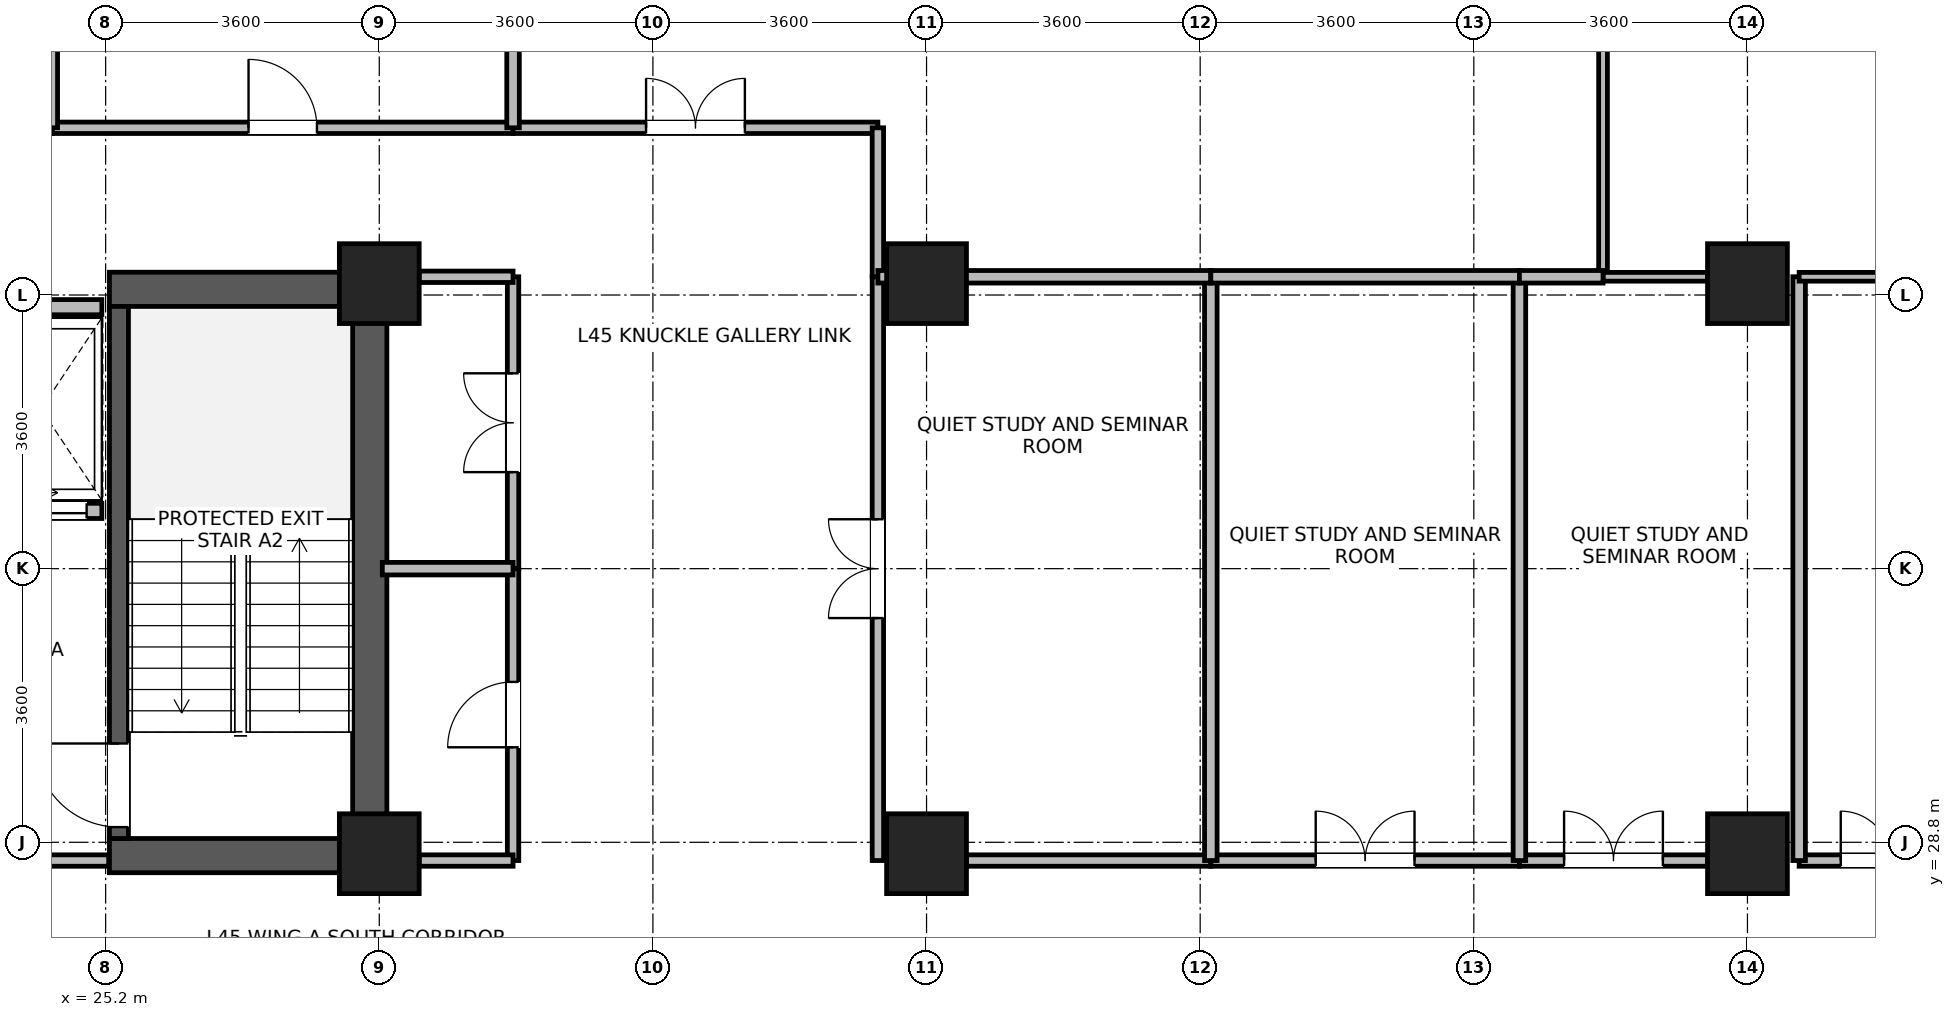
"""IFC4 building model, lengths in metres.
Left out: names, types, materials, properties, quantities, classifications, styles, units other than length and angle.
Written with IfcOpenShell. Run it as: python <this file> out.ifc"""

import sys

from ifc_helpers import new_model, si_unit, direction, frame, frame_2d, origin, origin_2d, place, context, subcontext, project, spatial, rectangle, extrude, source, transform, mapped, element, fill, save


model = new_model("IFC4")
c1 = context("Model", 3, precision=1e-05, world=origin(), true_north=direction((0.0, 1.0)))
c2 = subcontext(c1, "Body", "Model", "MODEL_VIEW")
j1 = project(units=[si_unit("LENGTHUNIT", "METRE"), si_unit("PLANEANGLEUNIT", "RADIAN")], contexts=[c1])
p1 = place(None, origin())
s1 = spatial("IfcSite", under=j1, at=p1, CompositionType="ELEMENT")
p2 = place(p1, origin())
s2 = spatial("IfcBuilding", under=s1, at=p2, CompositionType="ELEMENT")
p3 = place(p2, frame((0.0, 0.0, 177.2)))
s3 = spatial("IfcBuildingStorey", under=s2, at=p3, CompositionType="ELEMENT", Elevation=177.2)
p4 = place(p3, frame((28.675, 28.4, 0.0), z_axis=(0.0, 0.0, 1.0), x_axis=(0.0, 1.0, 0.0)))
e1 = element("IfcWall", 1, at=p4, inside=s3, PredefinedType="SHEAR", context=c2, shape_type="SweptSolid", body=[
    extrude(rectangle(XDim=7.9, YDim=0.45, at=frame_2d((3.95, 0.0))), origin(), (0.0, 0.0, 1.0), 3.46),
])
for number, where, z_axis, x_axis in (
    (2, (25.25, 28.625, 0.0), (0.0, 0.0, 1.0), (1.0, 0.0, 0.0)),
    (3, (25.25, 36.075, 0.0), (0.0, 0.0, 1.0), (1.0, 0.0, 0.0)),
):
    element("IfcWall", number, at=place(p3, frame(where, z_axis=z_axis, x_axis=x_axis)), inside=s3, PredefinedType="SHEAR", context=c2, shape_type="SweptSolid", body=[
        extrude(rectangle(XDim=3.2, YDim=0.45, at=frame_2d((1.6, 0.0))), origin(), (0.0, 0.0, 1.0), 3.46),
    ])
p5 = place(p3, frame((25.375, 28.85, 0.0), z_axis=(0.0, 0.0, 1.0), x_axis=(0.0, 1.0, 0.0)))
e4 = element("IfcWall", 4, at=p5, inside=s3, PredefinedType="SHEAR", context=c2, shape_type="SweptSolid", body=[
    extrude(rectangle(XDim=7.0, YDim=0.25, at=frame_2d((3.5, 0.0))), origin(), (0.0, 0.0, 1.0), 3.46),
])
p6 = place(p5, frame((0.15, 0.0, 0.0)))
e5 = element("IfcOpeningElement", 5, at=p6, cuts=e4, PredefinedType="OPENING", context=c2, shape_type="SweptSolid", body=[
    extrude(rectangle(XDim=1.1, YDim=2.08, at=frame_2d((0.55, 1.04))), frame((0.0, 0.135, 0.0), z_axis=(0.0, -1.0, 0.0), x_axis=(1.0, 0.0, 0.0)), (0.0, 0.0, 1.0), 0.27),
])
m1 = source(origin(), c2, "Body", "SweptSolid", [
    extrude(rectangle(XDim=1.05, YDim=1.05, at=origin_2d()), origin(), (0.0, 0.0, 1.0), 3.7),
])
for number, where, z_axis, x_axis in (
    (6, (28.8, 28.65, 0.0), (0.0, 0.0, 1.0), (1.0, 0.0, 0.0)),
    (7, (28.8, 36.15, 0.0), (0.0, 0.0, 1.0), (1.0, 0.0, 0.0)),
    (8, (36.0, 28.65, 0.0), (0.0, 0.0, 1.0), (1.0, 0.0, 0.0)),
    (9, (36.0, 36.15, 0.0), (0.0, 0.0, 1.0), (1.0, 0.0, 0.0)),
    (10, (46.8, 28.65, 0.0), (0.0, 0.0, 1.0), (1.0, 0.0, 0.0)),
    (11, (46.8, 36.15, 0.0), (0.0, 0.0, 1.0), (1.0, 0.0, 0.0)),
):
    element("IfcColumn", number, at=place(p3, frame(where, z_axis=z_axis, x_axis=x_axis)), inside=s3, PredefinedType="COLUMN", context=c2, shape_type="MappedRepresentation", body=[
        mapped(m1, transform((0.0, 0.0, 0.0), x_axis=(1.0, 0.0, 0.0), y_axis=(0.0, 1.0, 0.0), z_axis=(0.0, 0.0, 1.0), scale=1.0)),
    ])
p7 = place(p3, frame((23.55, 33.16, 0.0), z_axis=(0.0, 0.0, 1.0), x_axis=(1.0, 0.0, 0.0)))
e12 = element("IfcWall", 12, at=p7, inside=s3, PredefinedType="PARTITIONING", context=c2, shape_type="SweptSolid", body=[
    extrude(rectangle(XDim=1.6, YDim=0.2, at=frame_2d((0.8, 0.0))), origin(), (0.0, 0.0, 1.0), 3.44),
])
p8 = place(p7, frame((0.2, 0.0, 0.0)))
e13 = element("IfcOpeningElement", 13, at=p8, cuts=e12, PredefinedType="OPENING", context=c2, shape_type="SweptSolid", body=[
    extrude(rectangle(XDim=1.2, YDim=2.12, at=frame_2d((0.6, 1.06))), frame((0.0, 0.11, 0.0), z_axis=(0.0, -1.0, 0.0), x_axis=(1.0, 0.0, 0.0)), (0.0, 0.0, 1.0), 0.22),
])
p9 = place(p3, frame((23.55, 35.84, 0.0), z_axis=(0.0, 0.0, 1.0), x_axis=(1.0, 0.0, 0.0)))
e14 = element("IfcWall", 14, at=p9, inside=s3, PredefinedType="PARTITIONING", context=c2, shape_type="SweptSolid", body=[
    extrude(rectangle(XDim=1.6, YDim=0.2, at=frame_2d((0.8, 0.0))), origin(), (0.0, 0.0, 1.0), 2.44),
])
p10 = place(p3, frame((35.36, 28.56, 0.0), z_axis=(0.0, 0.0, 1.0), x_axis=(0.0, 1.0, 0.0)))
e15 = element("IfcWall", 15, at=p10, inside=s3, PredefinedType="PARTITIONING", context=c2, shape_type="SweptSolid", body=[
    extrude(rectangle(XDim=7.68, YDim=0.15, at=frame_2d((3.84, 0.0))), origin(), (0.0, 0.0, 1.0), 3.44),
])
p11 = place(p10, frame((3.19, 0.0, 0.0)))
e16 = element("IfcOpeningElement", 16, at=p11, cuts=e15, PredefinedType="OPENING", context=c2, shape_type="SweptSolid", body=[
    extrude(rectangle(XDim=1.3, YDim=2.12, at=frame_2d((0.65, 1.06))), frame((0.0, 0.085, 0.0), z_axis=(0.0, -1.0, 0.0), x_axis=(1.0, 0.0, 0.0)), (0.0, 0.0, 1.0), 0.17),
])
p12 = place(p3, frame((47.48, 28.56, 0.0), z_axis=(0.0, 0.0, 1.0), x_axis=(1.0, 0.0, 0.0)))
e17 = element("IfcWall", 17, at=p12, inside=s3, PredefinedType="PARTITIONING", context=c2, shape_type="SweptSolid", body=[
    extrude(rectangle(XDim=2.395, YDim=0.15, at=frame_2d((1.198, 0.0))), origin(), (0.0, 0.0, 1.0), 2.84),
])
p13 = place(p12, frame((0.548, 0.0, 0.0)))
e18 = element("IfcOpeningElement", 18, at=p13, cuts=e17, PredefinedType="OPENING", context=c2, shape_type="SweptSolid", body=[
    extrude(rectangle(XDim=1.3, YDim=2.12, at=frame_2d((0.65, 1.06))), frame((0.0, 0.085, 0.0), z_axis=(0.0, -1.0, 0.0), x_axis=(1.0, 0.0, 0.0)), (0.0, 0.0, 1.0), 0.17),
])
p14 = place(p3, frame((24.5, 38.2, 0.0), z_axis=(0.0, 0.0, 1.0), x_axis=(1.0, 0.0, 0.0)))
e19 = element("IfcWall", 19, at=p14, inside=s3, PredefinedType="PARTITIONING", context=c2, shape_type="SweptSolid", body=[
    extrude(rectangle(XDim=6.06, YDim=0.15, at=frame_2d((3.03, 0.0))), origin(), (0.0, 0.0, 1.0), 3.44),
])
p15 = place(p14, frame((2.58, 0.0, 0.0)))
e20 = element("IfcOpeningElement", 20, at=p15, cuts=e19, PredefinedType="OPENING", context=c2, shape_type="SweptSolid", body=[
    extrude(rectangle(XDim=0.9, YDim=2.08, at=frame_2d((0.45, 1.04))), frame((0.0, 0.085, 0.0), z_axis=(0.0, -1.0, 0.0), x_axis=(1.0, 0.0, 0.0)), (0.0, 0.0, 1.0), 0.17),
])
p16 = place(p3, frame((30.56, 38.2, 0.0), z_axis=(0.0, 0.0, 1.0), x_axis=(1.0, 0.0, 0.0)))
e21 = element("IfcWall", 21, at=p16, inside=s3, PredefinedType="PARTITIONING", context=c2, shape_type="SweptSolid", body=[
    extrude(rectangle(XDim=4.8, YDim=0.15, at=frame_2d((2.4, 0.0))), origin(), (0.0, 0.0, 1.0), 3.44),
])
p17 = place(p16, frame((1.75, 0.0, 0.0)))
e22 = element("IfcOpeningElement", 22, at=p17, cuts=e21, PredefinedType="OPENING", context=c2, shape_type="SweptSolid", body=[
    extrude(rectangle(XDim=1.3, YDim=2.12, at=frame_2d((0.65, 1.06))), frame((0.0, 0.085, 0.0), z_axis=(0.0, -1.0, 0.0), x_axis=(1.0, 0.0, 0.0)), (0.0, 0.0, 1.0), 0.17),
])
p18 = place(p3, frame((36.525, 28.56, 0.0), z_axis=(0.0, 0.0, 1.0), x_axis=(1.0, 0.0, 0.0)))
e23 = element("IfcWall", 23, at=p18, inside=s3, PredefinedType="PARTITIONING", context=c2, shape_type="SweptSolid", body=[
    extrude(rectangle(XDim=3.215, YDim=0.15, at=frame_2d((1.607, 0.0))), origin(), (0.0, 0.0, 1.0), 2.84),
])
p19 = place(p3, frame((39.74, 28.56, 0.0), z_axis=(0.0, 0.0, 1.0), x_axis=(1.0, 0.0, 0.0)))
e24 = element("IfcWall", 24, at=p19, inside=s3, PredefinedType="PARTITIONING", context=c2, shape_type="SweptSolid", body=[
    extrude(rectangle(XDim=4.06, YDim=0.15, at=frame_2d((2.03, 0.0))), origin(), (0.0, 0.0, 1.0), 2.84),
])
p20 = place(p19, frame((1.38, 0.0, 0.0)))
e25 = element("IfcOpeningElement", 25, at=p20, cuts=e24, PredefinedType="OPENING", context=c2, shape_type="SweptSolid", body=[
    extrude(rectangle(XDim=1.3, YDim=2.12, at=frame_2d((0.65, 1.06))), frame((0.0, 0.085, 0.0), z_axis=(0.0, -1.0, 0.0), x_axis=(1.0, 0.0, 0.0)), (0.0, 0.0, 1.0), 0.17),
])
p21 = place(p3, frame((30.56, 32.4, 0.0), z_axis=(0.0, 0.0, 1.0), x_axis=(0.0, 1.0, 0.0)))
e26 = element("IfcWall", 26, at=p21, inside=s3, PredefinedType="PARTITIONING", context=c2, shape_type="SweptSolid", body=[
    extrude(rectangle(XDim=3.84, YDim=0.15, at=frame_2d((1.92, 0.0))), origin(), (0.0, 0.0, 1.0), 3.44),
])
p22 = place(p21, frame((1.27, 0.0, 0.0)))
e27 = element("IfcOpeningElement", 27, at=p22, cuts=e26, PredefinedType="OPENING", context=c2, shape_type="SweptSolid", body=[
    extrude(rectangle(XDim=1.3, YDim=2.12, at=frame_2d((0.65, 1.06))), frame((0.0, 0.085, 0.0), z_axis=(0.0, -1.0, 0.0), x_axis=(1.0, 0.0, 0.0)), (0.0, 0.0, 1.0), 0.17),
])
p23 = place(p3, frame((30.56, 28.56, 0.0), z_axis=(0.0, 0.0, 1.0), x_axis=(0.0, 1.0, 0.0)))
e28 = element("IfcWall", 28, at=p23, inside=s3, PredefinedType="PARTITIONING", context=c2, shape_type="SweptSolid", body=[
    extrude(rectangle(XDim=3.84, YDim=0.15, at=frame_2d((1.92, 0.0))), origin(), (0.0, 0.0, 1.0), 3.44),
])
p24 = place(p23, frame((1.49, 0.0, 0.0)))
e29 = element("IfcOpeningElement", 29, at=p24, cuts=e28, PredefinedType="OPENING", context=c2, shape_type="SweptSolid", body=[
    extrude(rectangle(XDim=0.86, YDim=2.02, at=frame_2d((0.43, 1.01))), frame((0.0, 0.085, 0.0), z_axis=(0.0, -1.0, 0.0), x_axis=(1.0, 0.0, 0.0)), (0.0, 0.0, 1.0), 0.17),
])
p25 = place(p3, frame((43.8, 28.56, 0.0), z_axis=(0.0, 0.0, 1.0), x_axis=(1.0, 0.0, 0.0)))
e30 = element("IfcWall", 30, at=p25, inside=s3, PredefinedType="PARTITIONING", context=c2, shape_type="SweptSolid", body=[
    extrude(rectangle(XDim=2.475, YDim=0.15, at=frame_2d((1.237, 0.0))), origin(), (0.0, 0.0, 1.0), 2.84),
])
p26 = place(p25, frame((0.587, 0.0, 0.0)))
e31 = element("IfcOpeningElement", 31, at=p26, cuts=e30, PredefinedType="OPENING", context=c2, shape_type="SweptSolid", body=[
    extrude(rectangle(XDim=1.3, YDim=2.12, at=frame_2d((0.65, 1.06))), frame((0.0, 0.085, 0.0), z_axis=(0.0, -1.0, 0.0), x_axis=(1.0, 0.0, 0.0)), (0.0, 0.0, 1.0), 0.17),
])
p27 = place(p3, frame((35.36, 36.24, 0.0), z_axis=(0.0, 0.0, 1.0), x_axis=(0.0, 1.0, 0.0)))
e32 = element("IfcWall", 32, at=p27, inside=s3, PredefinedType="PARTITIONING", context=c2, shape_type="SweptSolid", body=[
    extrude(rectangle(XDim=1.96, YDim=0.15, at=frame_2d((0.98, 0.0))), origin(), (0.0, 0.0, 1.0), 3.44),
])
for number, where, z_axis, x_axis in (
    (33, (29.325, 28.56, 0.0), (0.0, 0.0, 1.0), (1.0, 0.0, 0.0)),
    (34, (29.325, 36.24, 0.0), (0.0, 0.0, 1.0), (1.0, 0.0, 0.0)),
):
    element("IfcWall", number, at=place(p3, frame(where, z_axis=z_axis, x_axis=x_axis)), inside=s3, PredefinedType="PARTITIONING", context=c2, shape_type="SweptSolid", body=[
        extrude(rectangle(XDim=1.235, YDim=0.15, at=frame_2d((0.618, 0.0))), origin(), (0.0, 0.0, 1.0), 2.84),
    ])
for number, where, z_axis, x_axis in (
    (35, (39.74, 28.56, 0.0), (0.0, 0.0, 1.0), (0.0, 1.0, 0.0)),
    (36, (43.8, 28.56, 0.0), (0.0, 0.0, 1.0), (0.0, 1.0, 0.0)),
    (37, (47.48, 28.56, 0.0), (0.0, 0.0, 1.0), (0.0, 1.0, 0.0)),
):
    element("IfcWall", number, at=place(p3, frame(where, z_axis=z_axis, x_axis=x_axis)), inside=s3, PredefinedType="PARTITIONING", context=c2, shape_type="SweptSolid", body=[
        extrude(rectangle(XDim=7.68, YDim=0.165, at=frame_2d((3.84, 0.0))), origin(), (0.0, 0.0, 1.0), 3.44),
    ])
p28 = place(p3, frame((47.48, 36.24, 0.0), z_axis=(0.0, 0.0, 1.0), x_axis=(1.0, 0.0, 0.0)))
e38 = element("IfcWall", 38, at=p28, inside=s3, PredefinedType="PARTITIONING", context=c2, shape_type="SweptSolid", body=[
    extrude(rectangle(XDim=2.395, YDim=0.115, at=frame_2d((1.198, 0.0))), origin(), (0.0, 0.0, 1.0), 2.84),
])
p29 = place(p3, frame((44.9, 36.24, 0.0), z_axis=(0.0, 0.0, 1.0), x_axis=(0.0, 1.0, 0.0)))
e39 = element("IfcWall", 39, at=p29, inside=s3, PredefinedType="PARTITIONING", context=c2, shape_type="SweptSolid", body=[
    extrude(rectangle(XDim=3.228, YDim=0.115, at=frame_2d((1.614, 0.0))), origin(), (0.0, 0.0, 1.0), 3.44),
])
p30 = place(p3, frame((24.5, 38.2, 0.0), z_axis=(0.0, 0.0, 1.0), x_axis=(0.0, 1.0, 0.0)))
e40 = element("IfcWall", 40, at=p30, inside=s3, PredefinedType="PARTITIONING", context=c2, shape_type="SweptSolid", body=[
    extrude(rectangle(XDim=4.868, YDim=0.135, at=frame_2d((2.434, 0.0))), origin(), (0.0, 0.0, 1.0), 3.44),
])
p31 = place(p3, frame((30.56, 38.2, 0.0), z_axis=(0.0, 0.0, 1.0), x_axis=(0.0, 1.0, 0.0)))
e41 = element("IfcWall", 41, at=p31, inside=s3, PredefinedType="PARTITIONING", context=c2, shape_type="SweptSolid", body=[
    extrude(rectangle(XDim=4.868, YDim=0.165, at=frame_2d((2.434, 0.0))), origin(), (0.0, 0.0, 1.0), 3.44),
])
p32 = place(p3, frame((35.36, 36.24, 0.0), z_axis=(0.0, 0.0, 1.0), x_axis=(1.0, 0.0, 0.0)))
e42 = element("IfcWall", 42, at=p32, inside=s3, PredefinedType="PARTITIONING", context=c2, shape_type="SweptSolid", body=[
    extrude(rectangle(XDim=4.38, YDim=0.165, at=frame_2d((2.19, 0.0))), origin(), (0.0, 0.0, 1.0), 2.84),
])
p33 = place(p3, frame((39.74, 36.24, 0.0), z_axis=(0.0, 0.0, 1.0), x_axis=(1.0, 0.0, 0.0)))
e43 = element("IfcWall", 43, at=p33, inside=s3, PredefinedType="PARTITIONING", context=c2, shape_type="SweptSolid", body=[
    extrude(rectangle(XDim=4.06, YDim=0.165, at=frame_2d((2.03, 0.0))), origin(), (0.0, 0.0, 1.0), 2.84),
])
p34 = place(p3, frame((21.76, 28.56, 0.0), z_axis=(0.0, 0.0, 1.0), x_axis=(1.0, 0.0, 0.0)))
e44 = element("IfcWall", 44, at=p34, inside=s3, PredefinedType="PARTITIONING", context=c2, shape_type="SweptSolid", body=[
    extrude(rectangle(XDim=3.48, YDim=0.15, at=frame_2d((1.74, 0.0))), origin(), (0.0, 0.0, 1.0), 2.44),
])
p35 = place(p3, frame((44.9, 36.24, 0.0), z_axis=(0.0, 0.0, 1.0), x_axis=(1.0, 0.0, 0.0)))
e45 = element("IfcWall", 45, at=p35, inside=s3, PredefinedType="PARTITIONING", context=c2, shape_type="SweptSolid", body=[
    extrude(rectangle(XDim=1.375, YDim=0.115, at=frame_2d((0.688, 0.0))), origin(), (0.0, 0.0, 1.0), 2.84),
])
p36 = place(p3, frame((28.84, 32.4, 0.0), z_axis=(0.0, 0.0, 1.0), x_axis=(1.0, 0.0, 0.0)))
e46 = element("IfcWall", 46, at=p36, inside=s3, PredefinedType="PARTITIONING", context=c2, shape_type="SweptSolid", body=[
    extrude(rectangle(XDim=1.72, YDim=0.165, at=frame_2d((0.86, 0.0))), origin(), (0.0, 0.0, 1.0), 3.44),
])
p37 = place(p3, frame((43.8, 36.24, 0.0), z_axis=(0.0, 0.0, 1.0), x_axis=(1.0, 0.0, 0.0)))
e47 = element("IfcWall", 47, at=p37, inside=s3, PredefinedType="PARTITIONING", context=c2, shape_type="SweptSolid", body=[
    extrude(rectangle(XDim=1.1, YDim=0.165, at=frame_2d((0.55, 0.0))), origin(), (0.0, 0.0, 1.0), 2.84),
])
p38 = place(p6, origin())
e48 = element("IfcDoor", 48, at=p38, inside=s3, OperationType="SINGLE_SWING_RIGHT", PredefinedType="DOOR", context=c2, shape_type="SweptSolid", body=[
    extrude(rectangle(XDim=1.1, YDim=2.08, at=frame_2d((0.55, 1.04))), frame((0.0, 0.025, 0.0), z_axis=(0.0, -1.0, 0.0), x_axis=(1.0, 0.0, 0.0)), (0.0, 0.0, 1.0), 0.05),
])
fill(e5, e48)
p39 = place(p8, origin())
e49 = element("IfcDoor", 49, at=p39, inside=s3, OperationType="SLIDING_TO_RIGHT", PredefinedType="DOOR", context=c2, shape_type="SweptSolid", body=[
    extrude(rectangle(XDim=1.2, YDim=2.12, at=frame_2d((0.6, 1.06))), frame((0.0, 0.025, 0.0), z_axis=(0.0, -1.0, 0.0), x_axis=(1.0, 0.0, 0.0)), (0.0, 0.0, 1.0), 0.05),
])
fill(e13, e49)
p40 = place(p11, origin())
e50 = element("IfcDoor", 50, at=p40, inside=s3, OperationType="DOUBLE_DOOR_SINGLE_SWING", PredefinedType="DOOR", context=c2, shape_type="SweptSolid", body=[
    extrude(rectangle(XDim=1.3, YDim=2.12, at=frame_2d((0.65, 1.06))), frame((0.0, 0.025, 0.0), z_axis=(0.0, -1.0, 0.0), x_axis=(1.0, 0.0, 0.0)), (0.0, 0.0, 1.0), 0.05),
])
fill(e16, e50)
p41 = place(p13, origin())
e51 = element("IfcDoor", 51, at=p41, inside=s3, OperationType="DOUBLE_DOOR_SINGLE_SWING", PredefinedType="DOOR", context=c2, shape_type="SweptSolid", body=[
    extrude(rectangle(XDim=1.3, YDim=2.12, at=frame_2d((0.65, 1.06))), frame((0.0, 0.025, 0.0), z_axis=(0.0, -1.0, 0.0), x_axis=(1.0, 0.0, 0.0)), (0.0, 0.0, 1.0), 0.05),
])
fill(e18, e51)
p42 = place(p15, origin())
e52 = element("IfcDoor", 52, at=p42, inside=s3, OperationType="SINGLE_SWING_LEFT", PredefinedType="DOOR", context=c2, shape_type="SweptSolid", body=[
    extrude(rectangle(XDim=0.9, YDim=2.08, at=frame_2d((0.45, 1.04))), frame((0.0, 0.025, 0.0), z_axis=(0.0, -1.0, 0.0), x_axis=(1.0, 0.0, 0.0)), (0.0, 0.0, 1.0), 0.05),
])
fill(e20, e52)
p43 = place(p17, origin())
e53 = element("IfcDoor", 53, at=p43, inside=s3, OperationType="DOUBLE_DOOR_SINGLE_SWING", PredefinedType="DOOR", context=c2, shape_type="SweptSolid", body=[
    extrude(rectangle(XDim=1.3, YDim=2.12, at=frame_2d((0.65, 1.06))), frame((0.0, 0.025, 0.0), z_axis=(0.0, -1.0, 0.0), x_axis=(1.0, 0.0, 0.0)), (0.0, 0.0, 1.0), 0.05),
])
fill(e22, e53)
p44 = place(p20, origin())
e54 = element("IfcDoor", 54, at=p44, inside=s3, OperationType="DOUBLE_DOOR_SINGLE_SWING", PredefinedType="DOOR", context=c2, shape_type="SweptSolid", body=[
    extrude(rectangle(XDim=1.3, YDim=2.12, at=frame_2d((0.65, 1.06))), frame((0.0, 0.025, 0.0), z_axis=(0.0, -1.0, 0.0), x_axis=(1.0, 0.0, 0.0)), (0.0, 0.0, 1.0), 0.05),
])
fill(e25, e54)
p45 = place(p22, origin())
e55 = element("IfcDoor", 55, at=p45, inside=s3, OperationType="DOUBLE_DOOR_SINGLE_SWING", PredefinedType="DOOR", context=c2, shape_type="SweptSolid", body=[
    extrude(rectangle(XDim=1.3, YDim=2.12, at=frame_2d((0.65, 1.06))), frame((0.0, 0.025, 0.0), z_axis=(0.0, -1.0, 0.0), x_axis=(1.0, 0.0, 0.0)), (0.0, 0.0, 1.0), 0.05),
])
fill(e27, e55)
p46 = place(p24, origin())
e56 = element("IfcDoor", 56, at=p46, inside=s3, OperationType="SINGLE_SWING_LEFT", PredefinedType="DOOR", context=c2, shape_type="SweptSolid", body=[
    extrude(rectangle(XDim=0.86, YDim=2.02, at=frame_2d((0.43, 1.01))), frame((0.0, 0.025, 0.0), z_axis=(0.0, -1.0, 0.0), x_axis=(1.0, 0.0, 0.0)), (0.0, 0.0, 1.0), 0.05),
])
fill(e29, e56)
p47 = place(p26, origin())
e57 = element("IfcDoor", 57, at=p47, inside=s3, OperationType="DOUBLE_DOOR_SINGLE_SWING", PredefinedType="DOOR", context=c2, shape_type="SweptSolid", body=[
    extrude(rectangle(XDim=1.3, YDim=2.12, at=frame_2d((0.65, 1.06))), frame((0.0, 0.025, 0.0), z_axis=(0.0, -1.0, 0.0), x_axis=(1.0, 0.0, 0.0)), (0.0, 0.0, 1.0), 0.05),
])
fill(e31, e57)
save(model, sys.argv[1])
